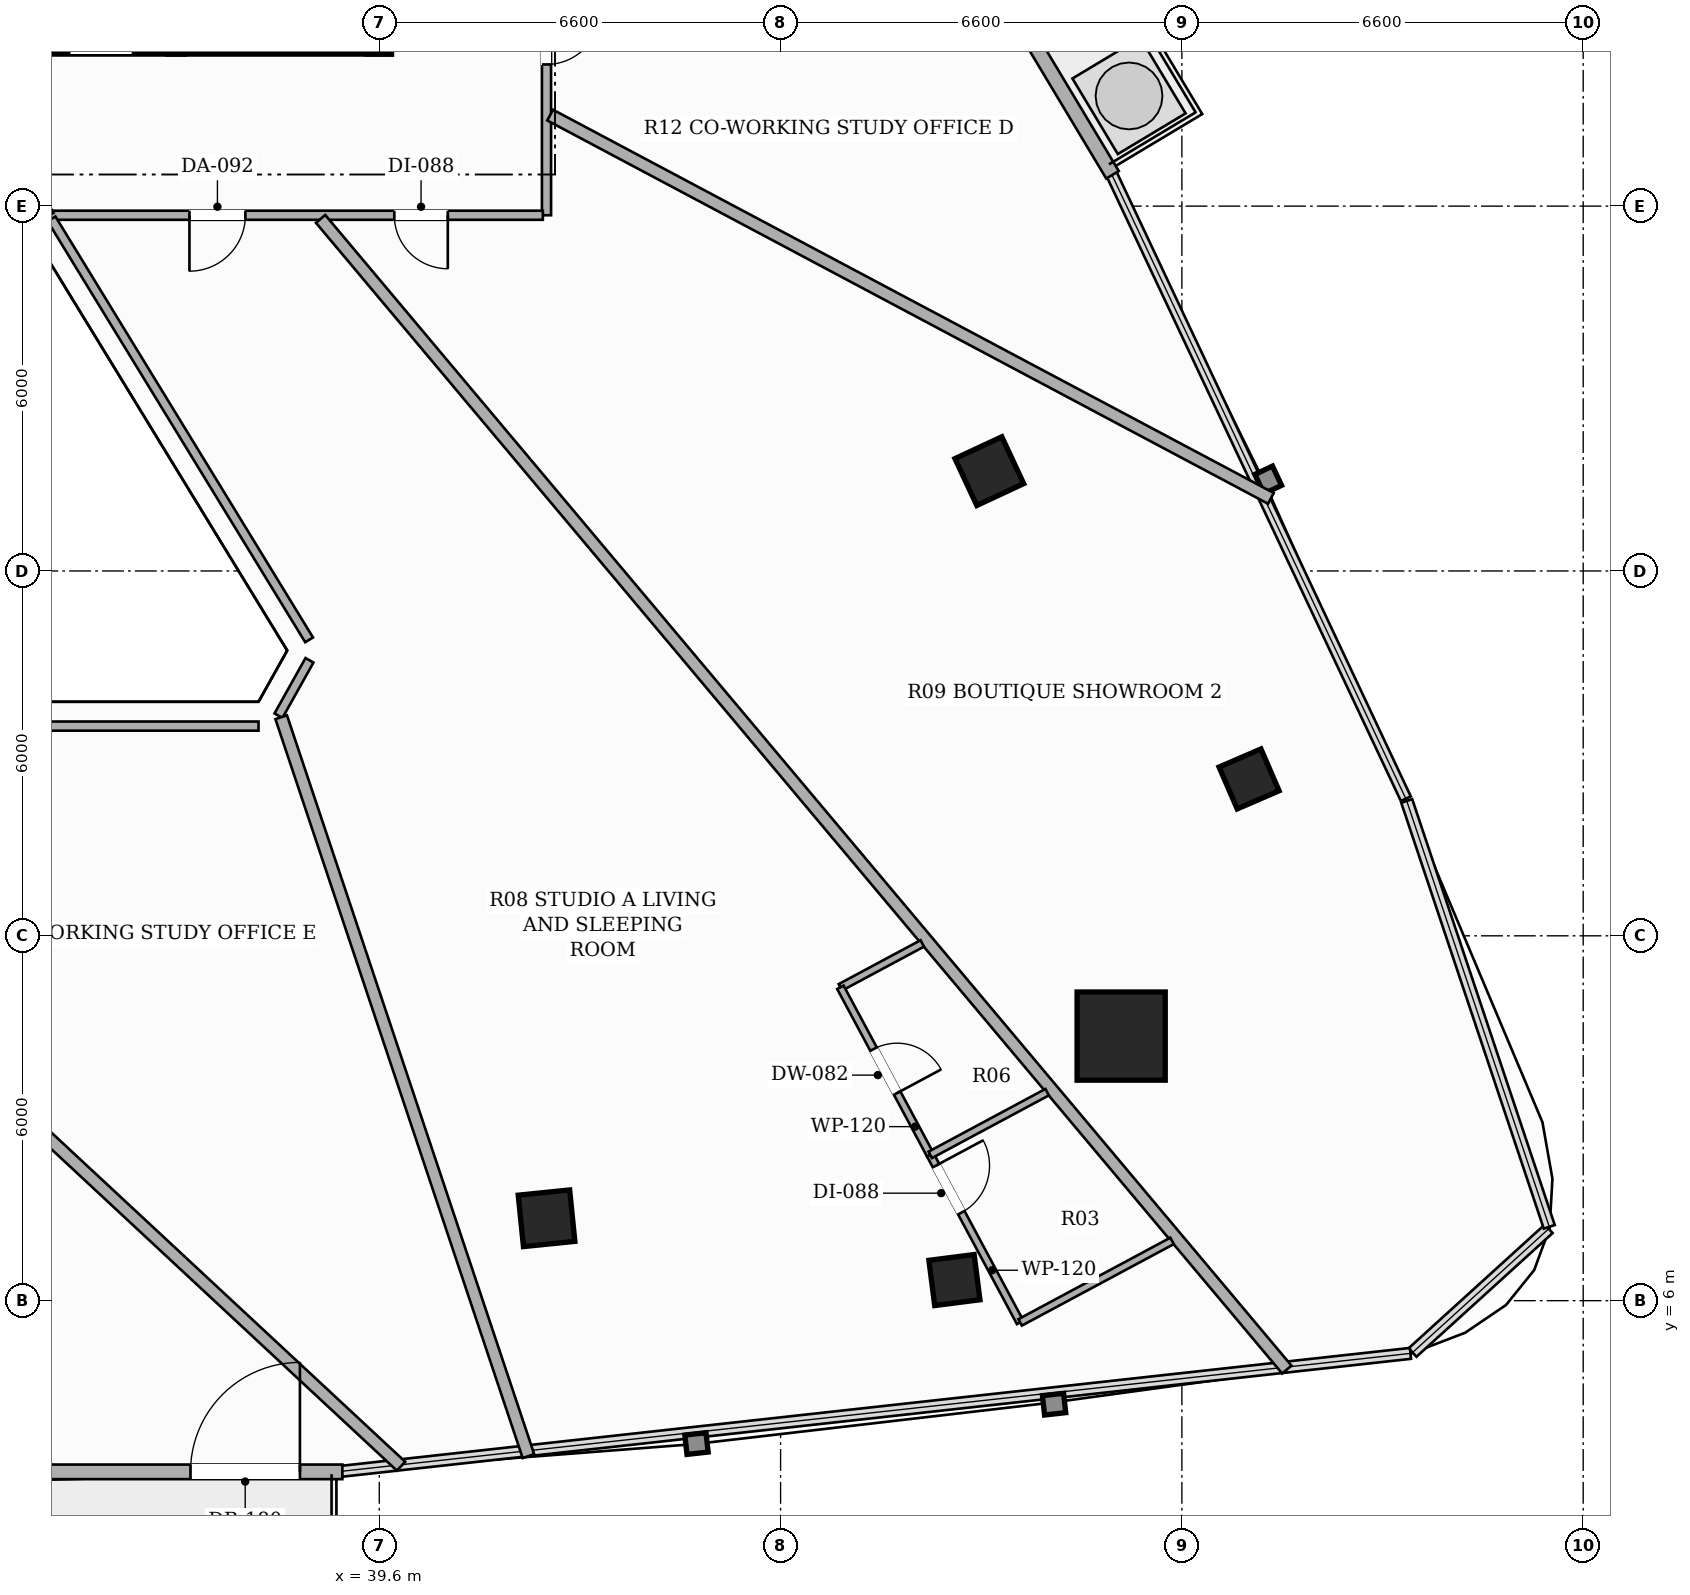
"""IFC4 building model, lengths in metres.
Left out: names, types, materials, properties, quantities, classifications, styles, units other than length and angle.
Written with IfcOpenShell. Run it as: python <this file> out.ifc"""

import sys

from ifc_helpers import new_model, si_unit, direction, frame, frame_2d, origin, origin_2d, place, context, subcontext, project, spatial, rectangle, hollow_rectangle, extrude, element, fill, save


model = new_model("IFC4")
c1 = context("Model", 3, precision=1e-05, world=origin(), true_north=direction((0.0, 1.0)))
c2 = subcontext(c1, "Body", "Model", "MODEL_VIEW")
j1 = project(units=[si_unit("LENGTHUNIT", "METRE"), si_unit("PLANEANGLEUNIT", "RADIAN")], contexts=[c1])
p1 = place(None, origin())
s1 = spatial("IfcSite", under=j1, at=p1, CompositionType="ELEMENT")
p2 = place(p1, origin())
s2 = spatial("IfcBuilding", under=s1, at=p2, CompositionType="ELEMENT")
p3 = place(p2, frame((0.0, 0.0, 129.8)))
s3 = spatial("IfcBuildingStorey", under=s2, at=p3, CompositionType="ELEMENT", Elevation=129.8)
p4 = place(p3, frame((26.2, 26.7, 0.0), z_axis=(0.0, 0.0, 1.0), x_axis=(1.0, 0.0, 0.0)))
e1 = element("IfcWall", 1, at=p4, inside=s3, PredefinedType="SHEAR", context=c2, shape_type="SweptSolid", body=[
    extrude(rectangle(XDim=13.6, YDim=0.4, at=frame_2d((6.8, 0.0))), origin(), (0.0, 0.0, 1.0), 3.3),
])
p5 = place(p4, frame((4.35, 0.0, 0.0)))
e2 = element("IfcOpeningElement", 2, at=p5, cuts=e1, PredefinedType="OPENING", context=c2, shape_type="SweptSolid", body=[
    extrude(rectangle(XDim=1.05, YDim=2.15, at=frame_2d((0.525, 1.075))), frame((0.0, 0.21, 0.0), z_axis=(0.0, -1.0, 0.0), x_axis=(1.0, 0.0, 0.0)), (0.0, 0.0, 1.0), 0.42),
])
p6 = place(p4, frame((8.3, 0.0, 0.0)))
e3 = element("IfcOpeningElement", 3, at=p6, cuts=e1, PredefinedType="OPENING", context=c2, shape_type="SweptSolid", body=[
    extrude(rectangle(XDim=1.05, YDim=2.15, at=frame_2d((0.525, 1.075))), frame((0.0, 0.21, 0.0), z_axis=(0.0, -1.0, 0.0), x_axis=(1.0, 0.0, 0.0)), (0.0, 0.0, 1.0), 0.42),
])
p7 = place(p3, frame((39.6, 26.5, 0.0), z_axis=(0.0, 0.0, 1.0), x_axis=(0.0, 1.0, 0.0)))
e4 = element("IfcWall", 4, at=p7, inside=s3, PredefinedType="SHEAR", context=c2, shape_type="SweptSolid", body=[
    extrude(rectangle(XDim=7.6, YDim=0.4, at=frame_2d((3.8, 0.0))), origin(), (0.0, 0.0, 1.0), 3.3),
])
p8 = place(p3, frame((36.26, 26.5, 0.0), z_axis=(0.0, 0.0, 1.0), x_axis=(0.0, 1.0, 0.0)))
e5 = element("IfcWall", 5, at=p8, inside=s3, PredefinedType="SHEAR", context=c2, shape_type="SweptSolid", body=[
    extrude(rectangle(XDim=8.15, YDim=0.28, at=frame_2d((4.075, 0.0))), origin(), (0.0, 0.0, 1.0), 3.3),
])
p9 = place(p8, frame((0.6, 0.0, 0.0)))
e6 = element("IfcOpeningElement", 6, at=p9, cuts=e5, PredefinedType="OPENING", context=c2, shape_type="SweptSolid", body=[
    extrude(rectangle(XDim=1.05, YDim=2.15, at=frame_2d((0.525, 1.075))), frame((0.0, 0.15, 0.0), z_axis=(0.0, -1.0, 0.0), x_axis=(1.0, 0.0, 0.0)), (0.0, 0.0, 1.0), 0.3),
])
p10 = place(p3, frame((51.801, 10.351, 0.0), z_axis=(0.0, 0.0, 1.0), x_axis=(1.0, 0.0, 0.0)))
e7 = element("IfcColumn", 7, at=p10, inside=s3, PredefinedType="COLUMN", context=c2, shape_type="SweptSolid", body=[
    extrude(hollow_rectangle(XDim=1.45, YDim=1.45, WallThickness=0.045, at=origin_2d()), origin(), (0.0, 0.0, 1.0), 3.3),
])
for number, where, z_axis, x_axis in (
    (8, (42.351, 7.355, 0.0), (0.0, 0.0, 1.0), (0.995, 0.101, 0.0)),
    (9, (49.633, 19.642, 0.0), (0.0, 0.0, 1.0), (-0.423, 0.906, 0.0)),
):
    element("IfcColumn", number, at=place(p3, frame(where, z_axis=z_axis, x_axis=x_axis)), inside=s3, PredefinedType="COLUMN", context=c2, shape_type="SweptSolid", body=[
        extrude(hollow_rectangle(XDim=0.85, YDim=0.85, WallThickness=0.028, at=origin_2d()), origin(), (0.0, 0.0, 1.0), 3.3),
    ])
for number, where, z_axis, x_axis in (
    (10, (49.059, 6.339, 0.0), (0.0, 0.0, 1.0), (0.992, 0.127, 0.0)),
    (11, (53.905, 14.58, 0.0), (0.0, 0.0, 1.0), (-0.397, 0.918, 0.0)),
):
    element("IfcColumn", number, at=place(p3, frame(where, z_axis=z_axis, x_axis=x_axis)), inside=s3, PredefinedType="COLUMN", context=c2, shape_type="SweptSolid", body=[
        extrude(hollow_rectangle(XDim=0.75, YDim=0.75, WallThickness=0.025, at=origin_2d()), origin(), (0.0, 0.0, 1.0), 3.3),
    ])
p11 = place(p3, frame((27.007, 3.185, 0.0), z_axis=(0.0, 0.0, 1.0), x_axis=(1.0, 0.0, 0.0)))
e12 = element("IfcWall", 12, at=p11, inside=s3, PredefinedType="SOLIDWALL", context=c2, shape_type="SweptSolid", body=[
    extrude(rectangle(XDim=11.986, YDim=0.24, at=frame_2d((5.993, 0.0))), origin(), (0.0, 0.0, 1.0), 2.624),
])
p12 = place(p11, frame((9.488, 0.0, 0.0)))
e13 = element("IfcOpeningElement", 13, at=p12, cuts=e12, PredefinedType="OPENING", context=c2, shape_type="SweptSolid", body=[
    extrude(rectangle(XDim=1.8, YDim=2.2, at=frame_2d((0.9, 1.1))), frame((0.0, 0.13, 0.0), z_axis=(0.0, -1.0, 0.0), x_axis=(1.0, 0.0, 0.0)), (0.0, 0.0, 1.0), 0.26),
])
p13 = place(p3, frame((51.659, 24.515, 0.0), z_axis=(0.0, 0.0, 1.0), x_axis=(-0.514343998995, 0.857583961311, 0.0)))
e14 = element("IfcWall", 14, at=p13, inside=s3, PredefinedType="SOLIDWALL", context=c2, shape_type="SweptSolid", body=[
    extrude(rectangle(XDim=11.593, YDim=0.24, at=frame_2d((5.797, 0.0))), origin(), (0.0, 0.0, 1.0), 2.624),
])
p14 = place(p13, frame((9.096, 0.0, 0.0)))
e15 = element("IfcOpeningElement", 15, at=p14, cuts=e14, PredefinedType="OPENING", context=c2, shape_type="SweptSolid", body=[
    extrude(rectangle(XDim=1.8, YDim=2.2, at=frame_2d((0.9, 1.1))), frame((0.0, 0.13, 0.0), z_axis=(0.0, -1.0, 0.0), x_axis=(1.0, 0.0, 0.0)), (0.0, 0.0, 1.0), 0.26),
])
p15 = place(p3, frame((42.35, 28.34, 0.0), z_axis=(0.0, 0.0, 1.0), x_axis=(0.0, -1.0, 0.0)))
e16 = element("IfcWall", 16, at=p15, inside=s3, PredefinedType="PARTITIONING", context=c2, shape_type="SweptSolid", body=[
    extrude(rectangle(XDim=4.49, YDim=0.15, at=frame_2d((2.245, 0.0))), origin(), (0.0, 0.0, 1.0), 2.721),
])
p16 = place(p15, frame((1.13, 0.0, 0.0)))
e17 = element("IfcOpeningElement", 17, at=p16, cuts=e16, PredefinedType="OPENING", context=c2, shape_type="SweptSolid", body=[
    extrude(rectangle(XDim=0.88, YDim=2.1, at=frame_2d((0.44, 1.05))), frame((0.0, 0.085, 0.0), z_axis=(0.0, -1.0, 0.0), x_axis=(1.0, 0.0, 0.0)), (0.0, 0.0, 1.0), 0.17),
])
p17 = place(p3, frame((42.29, 23.85, 0.0), z_axis=(0.0, 0.0, 1.0), x_axis=(-1.0, 0.0, 0.0)))
e18 = element("IfcWall", 18, at=p17, inside=s3, PredefinedType="PARTITIONING", context=c2, shape_type="SweptSolid", body=[
    extrude(rectangle(XDim=8.111, YDim=0.15, at=frame_2d((4.056, 0.0))), origin(), (0.0, 0.0, 1.0), 2.492),
])
p18 = place(p17, frame((1.563, 0.0, 0.0)))
e19 = element("IfcOpeningElement", 19, at=p18, cuts=e18, PredefinedType="OPENING", context=c2, shape_type="SweptSolid", body=[
    extrude(rectangle(XDim=0.88, YDim=2.1, at=frame_2d((0.44, 1.05))), frame((0.0, 0.085, 0.0), z_axis=(0.0, -1.0, 0.0), x_axis=(1.0, 0.0, 0.0)), (0.0, 0.0, 1.0), 0.17),
])
p19 = place(p17, frame((4.892, 0.0, 0.0)))
e20 = element("IfcOpeningElement", 20, at=p19, cuts=e18, PredefinedType="OPENING", context=c2, shape_type="SweptSolid", body=[
    extrude(rectangle(XDim=0.92, YDim=2.15, at=frame_2d((0.46, 1.075))), frame((0.0, 0.085, 0.0), z_axis=(0.0, -1.0, 0.0), x_axis=(1.0, 0.0, 0.0)), (0.0, 0.0, 1.0), 0.17),
])
p20 = place(p3, frame((34.179, 23.85, 0.0), z_axis=(0.0, 0.0, 1.0), x_axis=(-0.527828834635, 0.849350764601, 0.0)))
e21 = element("IfcWall", 21, at=p20, inside=s3, PredefinedType="PARTITIONING", context=c2, shape_type="SweptSolid", body=[
    extrude(rectangle(XDim=0.678, YDim=0.15, at=frame_2d((0.339, 0.0))), origin(), (0.0, 0.0, 1.0), 3.06),
])
p21 = place(p3, frame((34.21, 23.79, 0.0), z_axis=(0.0, 0.0, 1.0), x_axis=(0.521925672495, -0.852990968528, 0.0)))
e22 = element("IfcWall", 22, at=p21, inside=s3, PredefinedType="PARTITIONING", context=c2, shape_type="SweptSolid", body=[
    extrude(rectangle(XDim=8.116, YDim=0.15, at=frame_2d((4.058, 0.0))), origin(), (0.0, 0.0, 1.0), 2.721),
])
p22 = place(p3, frame((38.452, 16.531, 0.0), z_axis=(0.0, 0.0, 1.0), x_axis=(-0.488539276118, -0.872541904833, 0.0)))
e23 = element("IfcWall", 23, at=p22, inside=s3, PredefinedType="PARTITIONING", context=c2, shape_type="SweptSolid", body=[
    extrude(rectangle(XDim=1.044, YDim=0.15, at=frame_2d((0.522, 0.0))), origin(), (0.0, 0.0, 1.0), 3.06),
])
p23 = place(p3, frame((37.614, 15.449, 0.0), z_axis=(0.0, 0.0, 1.0), x_axis=(-1.0, 0.0, 0.0)))
e24 = element("IfcWall", 24, at=p23, inside=s3, PredefinedType="PARTITIONING", context=c2, shape_type="SweptSolid", body=[
    extrude(rectangle(XDim=9.228, YDim=0.15, at=frame_2d((4.614, 0.0))), origin(), (0.0, 0.0, 1.0), 2.721),
])
p24 = place(p3, frame((54.526, 4.867, 0.0), z_axis=(0.0, 0.0, 1.0), x_axis=(-0.643084567011, 0.765795168222, 0.0)))
e25 = element("IfcWall", 25, at=p24, inside=s3, PredefinedType="PARTITIONING", context=c2, shape_type="SweptSolid", body=[
    extrude(rectangle(XDim=24.71, YDim=0.2, at=frame_2d((12.355, 0.0))), origin(), (0.0, 0.0, 1.0), 2.413),
])
p25 = place(p3, frame((42.41, 25.497, 0.0), z_axis=(0.0, 0.0, 1.0), x_axis=(0.882944726502, -0.46947695358, 0.0)))
e26 = element("IfcWall", 26, at=p25, inside=s3, PredefinedType="PARTITIONING", context=c2, shape_type="SweptSolid", body=[
    extrude(rectangle(XDim=13.426, YDim=0.2, at=frame_2d((6.713, 0.0))), origin(), (0.0, 0.0, 1.0), 2.413),
])
p26 = place(p3, frame((42.053, 3.444, 0.0), z_axis=(0.0, 0.0, 1.0), x_axis=(-0.317325063931, 0.948316826699, 0.0)))
e27 = element("IfcWall", 27, at=p26, inside=s3, PredefinedType="PARTITIONING", context=c2, shape_type="SweptSolid", body=[
    extrude(rectangle(XDim=12.813, YDim=0.2, at=frame_2d((6.406, 0.0))), origin(), (0.0, 0.0, 1.0), 2.413),
])
p27 = place(p3, frame((39.958, 3.278, 0.0), z_axis=(0.0, 0.0, 1.0), x_axis=(-0.732155976475, 0.681137009795, 0.0)))
e28 = element("IfcWall", 28, at=p27, inside=s3, PredefinedType="PARTITIONING", context=c2, shape_type="SweptSolid", body=[
    extrude(rectangle(XDim=18.778, YDim=0.2, at=frame_2d((9.389, 0.0))), origin(), (0.0, 0.0, 1.0), 2.413),
])
p28 = place(p3, frame((48.53, 11.875, 0.0), z_axis=(0.0, 0.0, 1.0), x_axis=(-0.881239847135, -0.472669368398, 0.0)))
e29 = element("IfcWall", 29, at=p28, inside=s3, PredefinedType="PARTITIONING", context=c2, shape_type="SweptSolid", body=[
    extrude(rectangle(XDim=1.527, YDim=0.12, at=frame_2d((0.764, 0.0))), origin(), (0.0, 0.0, 1.0), 3.06),
])
p29 = place(p3, frame((47.184, 11.153, 0.0), z_axis=(0.0, 0.0, 1.0), x_axis=(0.472734891499, -0.881204699465, 0.0)))
e30 = element("IfcWall", 30, at=p29, inside=s3, PredefinedType="PARTITIONING", context=c2, shape_type="SweptSolid", body=[
    extrude(rectangle(XDim=3.126, YDim=0.12, at=frame_2d((1.563, 0.0))), origin(), (0.0, 0.0, 1.0), 2.721),
])
p30 = place(p29, frame((1.153, 0.0, 0.0)))
e31 = element("IfcOpeningElement", 31, at=p30, cuts=e30, PredefinedType="OPENING", context=c2, shape_type="SweptSolid", body=[
    extrude(rectangle(XDim=0.82, YDim=2.1, at=frame_2d((0.41, 1.05))), frame((0.0, 0.07, 0.0), z_axis=(0.0, -1.0, 0.0), x_axis=(1.0, 0.0, 0.0)), (0.0, 0.0, 1.0), 0.14),
])
p31 = place(p3, frame((48.662, 8.398, 0.0), z_axis=(0.0, 0.0, 1.0), x_axis=(0.472706781447, -0.881219778928, 0.0)))
e32 = element("IfcWall", 32, at=p31, inside=s3, PredefinedType="PARTITIONING", context=c2, shape_type="SweptSolid", body=[
    extrude(rectangle(XDim=3.126, YDim=0.12, at=frame_2d((1.563, 0.0))), origin(), (0.0, 0.0, 1.0), 2.413),
])
p32 = place(p31, frame((0.2, 0.0, 0.0)))
e33 = element("IfcOpeningElement", 33, at=p32, cuts=e32, PredefinedType="OPENING", context=c2, shape_type="SweptSolid", body=[
    extrude(rectangle(XDim=0.88, YDim=2.1, at=frame_2d((0.44, 1.05))), frame((0.0, 0.07, 0.0), z_axis=(0.0, -1.0, 0.0), x_axis=(1.0, 0.0, 0.0)), (0.0, 0.0, 1.0), 0.14),
])
p33 = place(p3, frame((50.14, 5.643, 0.0), z_axis=(0.0, 0.0, 1.0), x_axis=(0.881244272045, 0.472661118548, 0.0)))
e34 = element("IfcWall", 34, at=p33, inside=s3, PredefinedType="PARTITIONING", context=c2, shape_type="SweptSolid", body=[
    extrude(rectangle(XDim=2.835, YDim=0.12, at=frame_2d((1.417, 0.0))), origin(), (0.0, 0.0, 1.0), 2.619),
])
p34 = place(p3, frame((50.584, 9.429, 0.0), z_axis=(0.0, 0.0, 1.0), x_axis=(-0.88120690194, -0.472730785937, 0.0)))
e35 = element("IfcWall", 35, at=p34, inside=s3, PredefinedType="PARTITIONING", context=c2, shape_type="SweptSolid", body=[
    extrude(rectangle(XDim=2.181, YDim=0.12, at=frame_2d((1.09, 0.0))), origin(), (0.0, 0.0, 1.0), 3.06),
])
p35 = place(p12, origin())
e36 = element("IfcDoor", 36, at=p35, inside=s3, OperationType="SINGLE_SWING_RIGHT", PredefinedType="DOOR", context=c2, shape_type="SweptSolid", body=[
    extrude(rectangle(XDim=1.8, YDim=2.2, at=frame_2d((0.9, 1.1))), frame((0.0, 0.025, 0.0), z_axis=(0.0, -1.0, 0.0), x_axis=(1.0, 0.0, 0.0)), (0.0, 0.0, 1.0), 0.05),
])
fill(e13, e36)
p36 = place(p18, origin())
e37 = element("IfcDoor", 37, at=p36, inside=s3, OperationType="SINGLE_SWING_LEFT", PredefinedType="DOOR", context=c2, shape_type="SweptSolid", body=[
    extrude(rectangle(XDim=0.88, YDim=2.1, at=frame_2d((0.44, 1.05))), frame((0.0, 0.025, 0.0), z_axis=(0.0, -1.0, 0.0), x_axis=(1.0, 0.0, 0.0)), (0.0, 0.0, 1.0), 0.05),
])
fill(e19, e37)
p37 = place(p19, origin())
e38 = element("IfcDoor", 38, at=p37, inside=s3, OperationType="SINGLE_SWING_RIGHT", PredefinedType="DOOR", context=c2, shape_type="SweptSolid", body=[
    extrude(rectangle(XDim=0.92, YDim=2.15, at=frame_2d((0.46, 1.075))), frame((0.0, 0.025, 0.0), z_axis=(0.0, -1.0, 0.0), x_axis=(1.0, 0.0, 0.0)), (0.0, 0.0, 1.0), 0.05),
])
fill(e20, e38)
p38 = place(p30, origin())
e39 = element("IfcDoor", 39, at=p38, inside=s3, OperationType="SINGLE_SWING_RIGHT", PredefinedType="DOOR", context=c2, shape_type="SweptSolid", body=[
    extrude(rectangle(XDim=0.82, YDim=2.1, at=frame_2d((0.41, 1.05))), frame((0.0, 0.025, 0.0), z_axis=(0.0, -1.0, 0.0), x_axis=(1.0, 0.0, 0.0)), (0.0, 0.0, 1.0), 0.05),
])
fill(e31, e39)
p39 = place(p32, origin())
e40 = element("IfcDoor", 40, at=p39, inside=s3, OperationType="SINGLE_SWING_LEFT", PredefinedType="DOOR", context=c2, shape_type="SweptSolid", body=[
    extrude(rectangle(XDim=0.88, YDim=2.1, at=frame_2d((0.44, 1.05))), frame((0.0, 0.025, 0.0), z_axis=(0.0, -1.0, 0.0), x_axis=(1.0, 0.0, 0.0)), (0.0, 0.0, 1.0), 0.05),
])
fill(e33, e40)
p40 = place(p16, origin())
e41 = element("IfcDoor", 41, at=p40, inside=s3, OperationType="SINGLE_SWING_LEFT", PredefinedType="DOOR", context=c2, shape_type="SweptSolid", body=[
    extrude(rectangle(XDim=0.88, YDim=2.1, at=frame_2d((0.44, 1.05))), frame((0.0, 0.025, 0.0), z_axis=(0.0, -1.0, 0.0), x_axis=(1.0, 0.0, 0.0)), (0.0, 0.0, 1.0), 0.05),
])
fill(e17, e41)
save(model, sys.argv[1])
